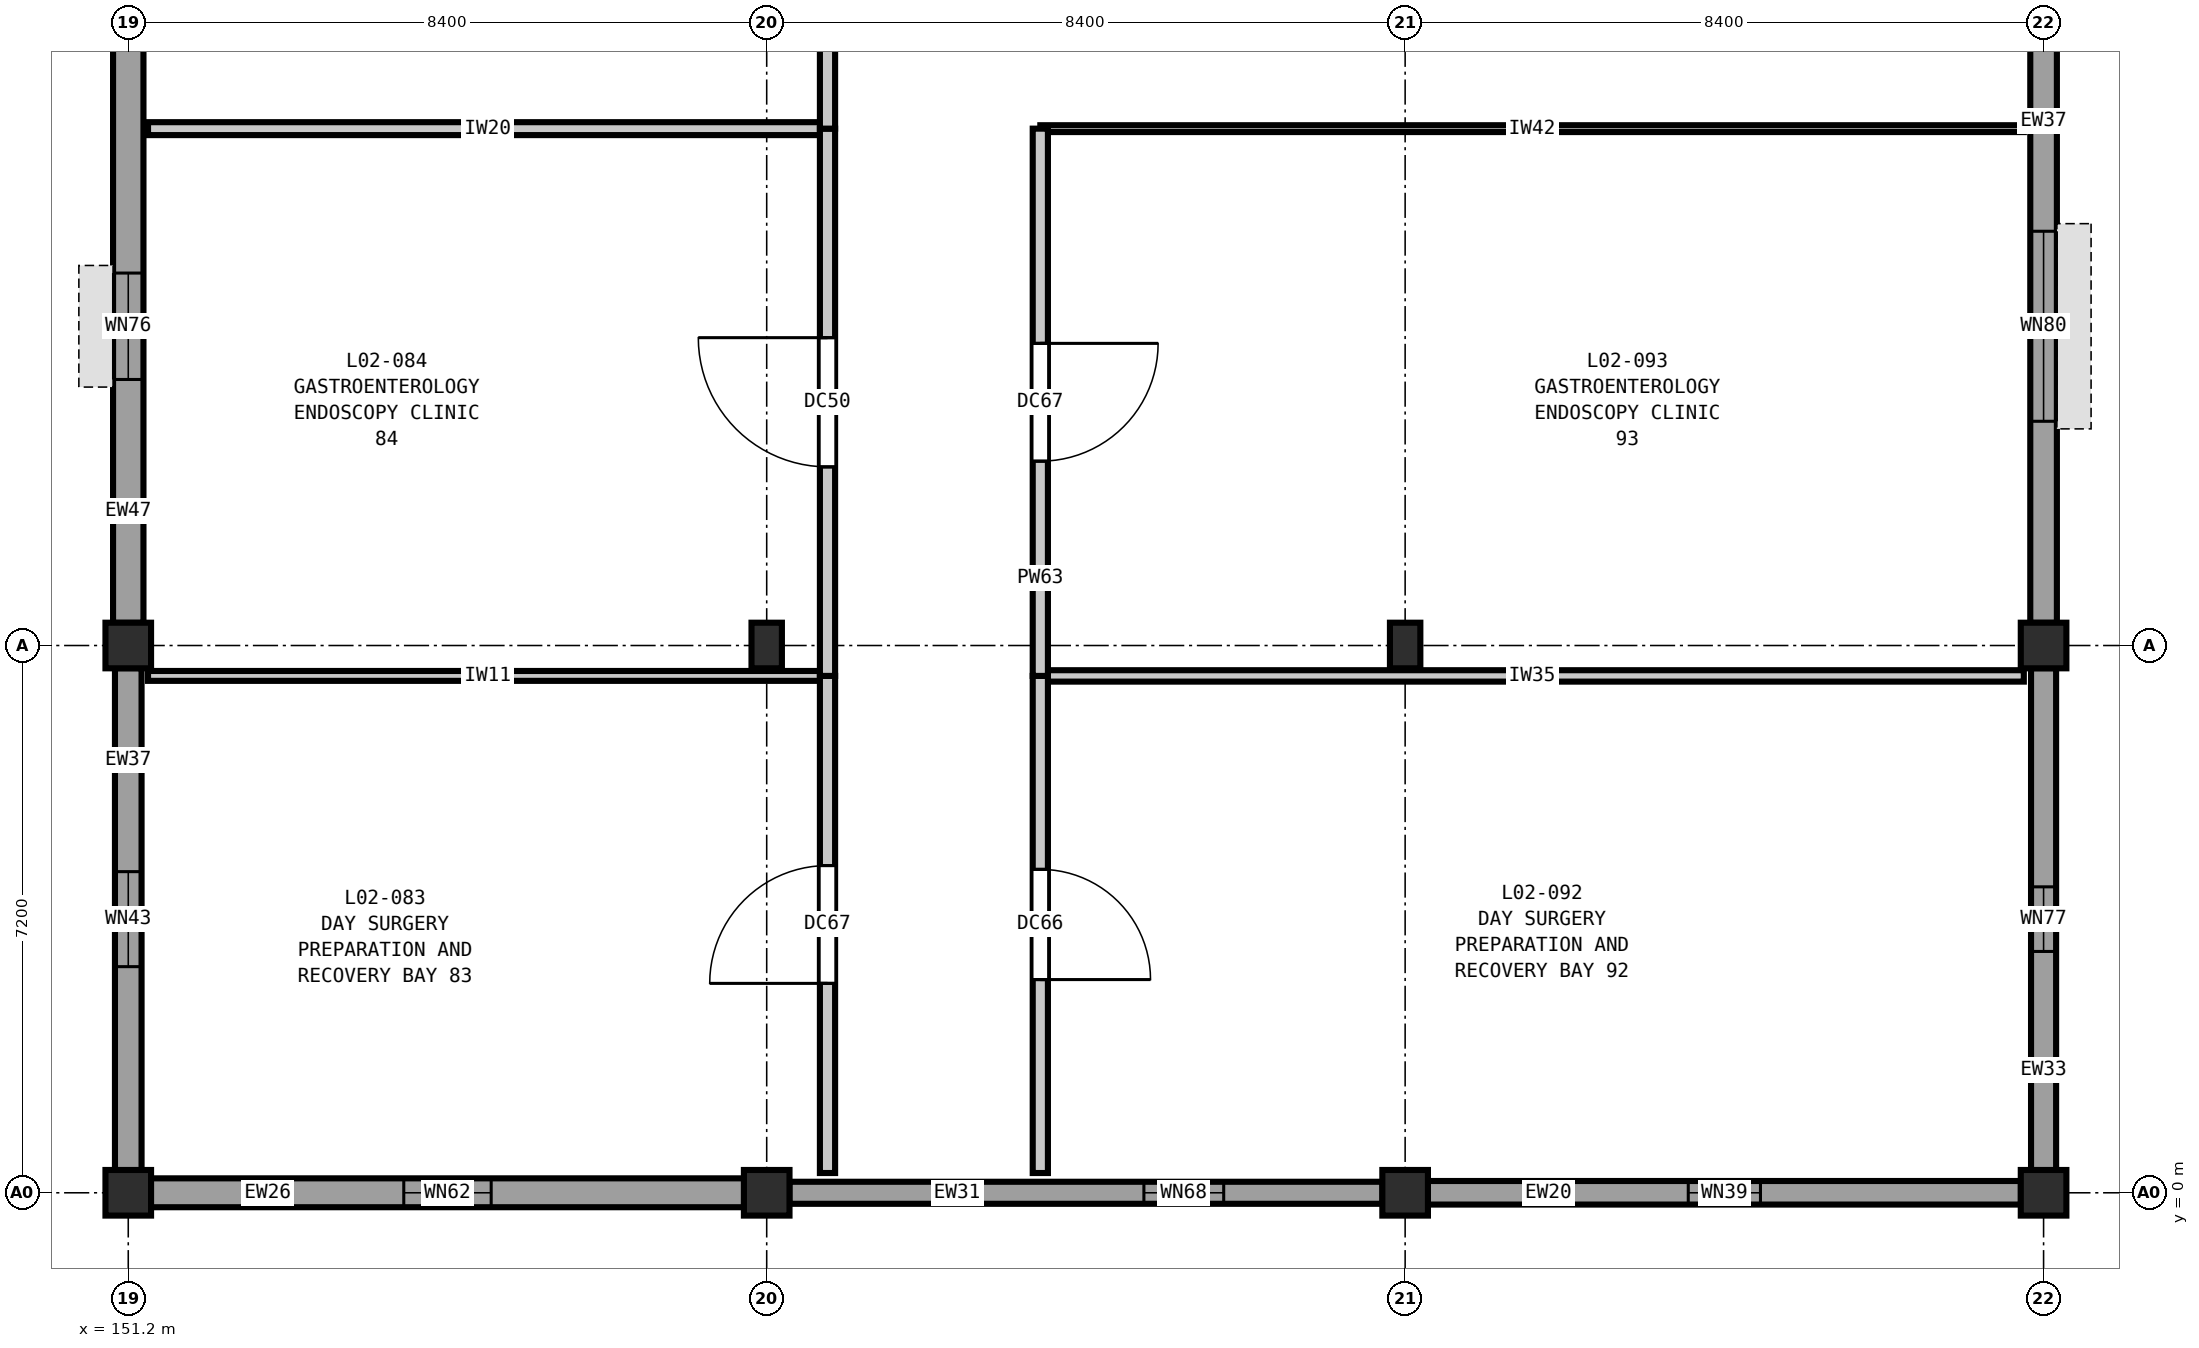
"""IFC4 building model, lengths in metres.
Left out: names, types, materials, properties, quantities, classifications, styles, units other than length and angle.
Written with IfcOpenShell. Run it as: python <this file> out.ifc"""

import sys

from ifc_helpers import new_model, si_unit, direction, frame, frame_2d, origin, origin_2d, place, context, subcontext, project, spatial, rectangle, extrude, element, fill, save


model = new_model("IFC4")
c1 = context("Model", 3, precision=1e-05, world=origin(), true_north=direction((0.0, 1.0)))
c2 = subcontext(c1, "Body", "Model", "MODEL_VIEW")
j1 = project(units=[si_unit("LENGTHUNIT", "METRE"), si_unit("PLANEANGLEUNIT", "RADIAN")], contexts=[c1])
p1 = place(None, origin())
s1 = spatial("IfcSite", under=j1, at=p1, CompositionType="ELEMENT")
p2 = place(p1, origin())
s2 = spatial("IfcBuilding", under=s1, at=p2, CompositionType="ELEMENT")
p3 = place(p2, frame((0.0, 0.0, 10.8)))
s3 = spatial("IfcBuildingStorey", under=s2, at=p3, CompositionType="ELEMENT", Elevation=10.8)
for number, where, z_axis, x_axis in (
    (1, (151.2, 0.0, 0.0), (0.0, 0.0, 1.0), (1.0, 0.0, 0.0)),
    (2, (151.2, 7.2, 0.0), (0.0, 0.0, 1.0), (1.0, 0.0, 0.0)),
    (3, (159.6, 0.0, 0.0), (0.0, 0.0, 1.0), (1.0, 0.0, 0.0)),
):
    element("IfcColumn", number, at=place(p3, frame(where, z_axis=z_axis, x_axis=x_axis)), inside=s3, PredefinedType="COLUMN", context=c2, shape_type="SweptSolid", body=[
        extrude(rectangle(XDim=0.6, YDim=0.6, at=origin_2d()), origin(), (0.0, 0.0, 1.0), 5.4),
    ])
p4 = place(p3, frame((159.6, 7.2, 0.0), z_axis=(0.0, 0.0, 1.0), x_axis=(1.0, 0.0, 0.0)))
e4 = element("IfcColumn", 4, at=p4, inside=s3, PredefinedType="COLUMN", context=c2, shape_type="SweptSolid", body=[
    extrude(rectangle(XDim=0.4, YDim=0.6, at=origin_2d()), origin(), (0.0, 0.0, 1.0), 5.4),
])
p5 = place(p3, frame((168.0, 0.0, 0.0), z_axis=(0.0, 0.0, 1.0), x_axis=(1.0, 0.0, 0.0)))
e5 = element("IfcColumn", 5, at=p5, inside=s3, PredefinedType="COLUMN", context=c2, shape_type="SweptSolid", body=[
    extrude(rectangle(XDim=0.6, YDim=0.6, at=origin_2d()), origin(), (0.0, 0.0, 1.0), 5.4),
])
p6 = place(p3, frame((168.0, 7.2, 0.0), z_axis=(0.0, 0.0, 1.0), x_axis=(1.0, 0.0, 0.0)))
e6 = element("IfcColumn", 6, at=p6, inside=s3, PredefinedType="COLUMN", context=c2, shape_type="SweptSolid", body=[
    extrude(rectangle(XDim=0.4, YDim=0.6, at=origin_2d()), origin(), (0.0, 0.0, 1.0), 5.4),
])
for number, where, z_axis, x_axis in (
    (7, (176.4, 0.0, 0.0), (0.0, 0.0, 1.0), (1.0, 0.0, 0.0)),
    (8, (176.4, 7.2, 0.0), (0.0, 0.0, 1.0), (1.0, 0.0, 0.0)),
):
    element("IfcColumn", number, at=place(p3, frame(where, z_axis=z_axis, x_axis=x_axis)), inside=s3, PredefinedType="COLUMN", context=c2, shape_type="SweptSolid", body=[
        extrude(rectangle(XDim=0.6, YDim=0.6, at=origin_2d()), origin(), (0.0, 0.0, 1.0), 5.4),
    ])
p7 = place(p3, frame((176.4, 15.302, 0.0), z_axis=(0.0, 0.0, 1.0), x_axis=(0.0, -1.0, 0.0)))
e9 = element("IfcWall", 9, at=p7, inside=s3, PredefinedType="SOLIDWALL", context=c2, shape_type="SweptSolid", body=[
    extrude(rectangle(XDim=7.804, YDim=0.35, at=frame_2d((3.902, 0.0))), origin(), (0.0, 0.0, 1.0), 4.68),
])
p8 = place(p7, frame((2.652, 0.0, 0.9)))
e10 = element("IfcOpeningElement", 10, at=p8, cuts=e9, PredefinedType="OPENING", context=c2, shape_type="SweptSolid", body=[
    extrude(rectangle(XDim=2.5, YDim=2.35, at=frame_2d((1.25, 1.175))), frame((0.0, 0.185, 0.0), z_axis=(0.0, -1.0, 0.0), x_axis=(1.0, 0.0, 0.0)), (0.0, 0.0, 1.0), 0.37),
])
p9 = place(p3, frame((176.4, 6.902, 0.0), z_axis=(0.0, 0.0, 1.0), x_axis=(0.0, -1.0, 0.0)))
e11 = element("IfcWall", 11, at=p9, inside=s3, PredefinedType="SOLIDWALL", context=c2, shape_type="SweptSolid", body=[
    extrude(rectangle(XDim=6.604, YDim=0.33, at=frame_2d((3.302, 0.0))), origin(), (0.0, 0.0, 1.0), 4.68),
])
p10 = place(p9, frame((2.877, 0.0, 0.9)))
e12 = element("IfcOpeningElement", 12, at=p10, cuts=e11, PredefinedType="OPENING", context=c2, shape_type="SweptSolid", body=[
    extrude(rectangle(XDim=0.85, YDim=1.4, at=frame_2d((0.425, 0.7))), frame((0.0, 0.175, 0.0), z_axis=(0.0, -1.0, 0.0), x_axis=(1.0, 0.0, 0.0)), (0.0, 0.0, 1.0), 0.35),
])
p11 = place(p3, frame((176.102, 0.0, 0.0), z_axis=(0.0, 0.0, 1.0), x_axis=(-1.0, 0.0, 0.0)))
e13 = element("IfcWall", 13, at=p11, inside=s3, PredefinedType="SOLIDWALL", context=c2, shape_type="SweptSolid", body=[
    extrude(rectangle(XDim=7.804, YDim=0.31, at=frame_2d((3.902, 0.0))), origin(), (0.0, 0.0, 1.0), 4.68),
])
p12 = place(p11, frame((3.427, 0.0, 0.9)))
e14 = element("IfcOpeningElement", 14, at=p12, cuts=e13, PredefinedType="OPENING", context=c2, shape_type="SweptSolid", body=[
    extrude(rectangle(XDim=0.95, YDim=1.4, at=frame_2d((0.475, 0.7))), frame((0.0, 0.165, 0.0), z_axis=(0.0, -1.0, 0.0), x_axis=(1.0, 0.0, 0.0)), (0.0, 0.0, 1.0), 0.33),
])
p13 = place(p3, frame((167.702, 0.0, 0.0), z_axis=(0.0, 0.0, 1.0), x_axis=(-1.0, 0.0, 0.0)))
e15 = element("IfcWall", 15, at=p13, inside=s3, PredefinedType="SOLIDWALL", context=c2, shape_type="SweptSolid", body=[
    extrude(rectangle(XDim=7.804, YDim=0.29, at=frame_2d((3.902, 0.0))), origin(), (0.0, 0.0, 1.0), 4.68),
])
p14 = place(p13, frame((2.089, 0.0, 0.9)))
e16 = element("IfcOpeningElement", 16, at=p14, cuts=e15, PredefinedType="OPENING", context=c2, shape_type="SweptSolid", body=[
    extrude(rectangle(XDim=1.05, YDim=1.4, at=frame_2d((0.525, 0.7))), frame((0.0, 0.155, 0.0), z_axis=(0.0, -1.0, 0.0), x_axis=(1.0, 0.0, 0.0)), (0.0, 0.0, 1.0), 0.31),
])
p15 = place(p3, frame((159.302, 0.0, 0.0), z_axis=(0.0, 0.0, 1.0), x_axis=(-1.0, 0.0, 0.0)))
e17 = element("IfcWall", 17, at=p15, inside=s3, PredefinedType="SOLIDWALL", context=c2, shape_type="SweptSolid", body=[
    extrude(rectangle(XDim=7.804, YDim=0.38, at=frame_2d((3.902, 0.0))), origin(), (0.0, 0.0, 1.0), 4.68),
])
p16 = place(p15, frame((3.327, 0.0, 0.9)))
e18 = element("IfcOpeningElement", 18, at=p16, cuts=e17, PredefinedType="OPENING", context=c2, shape_type="SweptSolid", body=[
    extrude(rectangle(XDim=1.15, YDim=1.4, at=frame_2d((0.575, 0.7))), frame((0.0, 0.2, 0.0), z_axis=(0.0, -1.0, 0.0), x_axis=(1.0, 0.0, 0.0)), (0.0, 0.0, 1.0), 0.4),
])
p17 = place(p3, frame((151.2, 0.298, 0.0), z_axis=(0.0, 0.0, 1.0), x_axis=(0.0, 1.0, 0.0)))
e19 = element("IfcWall", 19, at=p17, inside=s3, PredefinedType="SOLIDWALL", context=c2, shape_type="SweptSolid", body=[
    extrude(rectangle(XDim=6.604, YDim=0.35, at=frame_2d((3.302, 0.0))), origin(), (0.0, 0.0, 1.0), 4.68),
])
p18 = place(p17, frame((2.677, 0.0, 0.9)))
e20 = element("IfcOpeningElement", 20, at=p18, cuts=e19, PredefinedType="OPENING", context=c2, shape_type="SweptSolid", body=[
    extrude(rectangle(XDim=1.25, YDim=1.4, at=frame_2d((0.625, 0.7))), frame((0.0, 0.185, 0.0), z_axis=(0.0, -1.0, 0.0), x_axis=(1.0, 0.0, 0.0)), (0.0, 0.0, 1.0), 0.37),
])
p19 = place(p3, frame((151.2, 7.498, 0.0), z_axis=(0.0, 0.0, 1.0), x_axis=(0.0, 1.0, 0.0)))
e21 = element("IfcWall", 21, at=p19, inside=s3, PredefinedType="SOLIDWALL", context=c2, shape_type="SweptSolid", body=[
    extrude(rectangle(XDim=7.804, YDim=0.4, at=frame_2d((3.902, 0.0))), origin(), (0.0, 0.0, 1.0), 4.68),
])
p20 = place(p19, frame((3.202, 0.0, 0.9)))
e22 = element("IfcOpeningElement", 22, at=p20, cuts=e21, PredefinedType="OPENING", context=c2, shape_type="SweptSolid", body=[
    extrude(rectangle(XDim=1.4, YDim=1.4, at=frame_2d((0.7, 0.7))), frame((0.0, 0.21, 0.0), z_axis=(0.0, -1.0, 0.0), x_axis=(1.0, 0.0, 0.0)), (0.0, 0.0, 1.0), 0.42),
])
p21 = place(p3, frame((151.46, 6.8, 0.0), z_axis=(0.0, 0.0, 1.0), x_axis=(1.0, 0.0, 0.0)))
e23 = element("IfcWall", 23, at=p21, inside=s3, PredefinedType="PARTITIONING", context=c2, shape_type="SweptSolid", body=[
    extrude(rectangle(XDim=8.94, YDim=0.13, at=frame_2d((4.47, 0.0))), origin(), (0.0, 0.0, 1.0), 5.07),
])
p22 = place(p3, frame((163.2, 6.8, 0.0), z_axis=(0.0, 0.0, 1.0), x_axis=(1.0, 0.0, 0.0)))
e24 = element("IfcWall", 24, at=p22, inside=s3, PredefinedType="PARTITIONING", context=c2, shape_type="SweptSolid", body=[
    extrude(rectangle(XDim=12.94, YDim=0.15, at=frame_2d((6.47, 0.0))), origin(), (0.0, 0.0, 1.0), 5.07),
])
p23 = place(p3, frame((151.46, 14.0, 0.0), z_axis=(0.0, 0.0, 1.0), x_axis=(1.0, 0.0, 0.0)))
e25 = element("IfcWall", 25, at=p23, inside=s3, PredefinedType="PARTITIONING", context=c2, shape_type="SweptSolid", body=[
    extrude(rectangle(XDim=8.94, YDim=0.17, at=frame_2d((4.47, 0.0))), origin(), (0.0, 0.0, 1.0), 5.07),
])
p24 = place(p3, frame((163.2, 14.0, 0.0), z_axis=(0.0, 0.0, 1.0), x_axis=(1.0, 0.0, 0.0)))
e26 = element("IfcWall", 26, at=p24, inside=s3, PredefinedType="PARTITIONING", context=c2, shape_type="SweptSolid", body=[
    extrude(rectangle(XDim=12.94, YDim=0.09, at=frame_2d((6.47, 0.0))), origin(), (0.0, 0.0, 1.0), 5.07),
])
p25 = place(p3, frame((160.4, 0.26, 0.0), z_axis=(0.0, 0.0, 1.0), x_axis=(0.0, 1.0, 0.0)))
e27 = element("IfcWall", 27, at=p25, inside=s3, PredefinedType="PARTITIONING", context=c2, shape_type="SweptSolid", body=[
    extrude(rectangle(XDim=6.54, YDim=0.2, at=frame_2d((3.27, 0.0))), origin(), (0.0, 0.0, 1.0), 5.07),
])
p26 = place(p25, frame((2.495, 0.0, 0.0)))
e28 = element("IfcOpeningElement", 28, at=p26, cuts=e27, PredefinedType="OPENING", context=c2, shape_type="SweptSolid", body=[
    extrude(rectangle(XDim=1.55, YDim=2.25, at=frame_2d((0.775, 1.125))), frame((0.0, 0.11, 0.0), z_axis=(0.0, -1.0, 0.0), x_axis=(1.0, 0.0, 0.0)), (0.0, 0.0, 1.0), 0.22),
])
p27 = place(p3, frame((160.4, 6.8, 0.0), z_axis=(0.0, 0.0, 1.0), x_axis=(0.0, 1.0, 0.0)))
e29 = element("IfcWall", 29, at=p27, inside=s3, PredefinedType="PARTITIONING", context=c2, shape_type="SweptSolid", body=[
    extrude(rectangle(XDim=7.2, YDim=0.2, at=frame_2d((3.6, 0.0))), origin(), (0.0, 0.0, 1.0), 5.07),
])
p28 = place(p27, frame((2.75, 0.0, 0.0)))
e30 = element("IfcOpeningElement", 30, at=p28, cuts=e29, PredefinedType="OPENING", context=c2, shape_type="SweptSolid", body=[
    extrude(rectangle(XDim=1.7, YDim=2.3, at=frame_2d((0.85, 1.15))), frame((0.0, 0.11, 0.0), z_axis=(0.0, -1.0, 0.0), x_axis=(1.0, 0.0, 0.0)), (0.0, 0.0, 1.0), 0.22),
])
p29 = place(p3, frame((160.4, 14.0, 0.0), z_axis=(0.0, 0.0, 1.0), x_axis=(0.0, 1.0, 0.0)))
e31 = element("IfcWall", 31, at=p29, inside=s3, PredefinedType="PARTITIONING", context=c2, shape_type="SweptSolid", body=[
    extrude(rectangle(XDim=6.8, YDim=0.2, at=frame_2d((3.4, 0.0))), origin(), (0.0, 0.0, 1.0), 5.07),
])
p30 = place(p29, frame((2.475, 0.0, 0.0)))
e32 = element("IfcOpeningElement", 32, at=p30, cuts=e31, PredefinedType="OPENING", context=c2, shape_type="SweptSolid", body=[
    extrude(rectangle(XDim=1.85, YDim=2.3, at=frame_2d((0.925, 1.15))), frame((0.0, 0.11, 0.0), z_axis=(0.0, -1.0, 0.0), x_axis=(1.0, 0.0, 0.0)), (0.0, 0.0, 1.0), 0.22),
])
p31 = place(p3, frame((163.2, 0.26, 0.0), z_axis=(0.0, 0.0, 1.0), x_axis=(0.0, 1.0, 0.0)))
e33 = element("IfcWall", 33, at=p31, inside=s3, PredefinedType="PARTITIONING", context=c2, shape_type="SweptSolid", body=[
    extrude(rectangle(XDim=6.54, YDim=0.2, at=frame_2d((3.27, 0.0))), origin(), (0.0, 0.0, 1.0), 5.07),
])
p32 = place(p31, frame((2.545, 0.0, 0.0)))
e34 = element("IfcOpeningElement", 34, at=p32, cuts=e33, PredefinedType="OPENING", context=c2, shape_type="SweptSolid", body=[
    extrude(rectangle(XDim=1.45, YDim=2.25, at=frame_2d((0.725, 1.125))), frame((0.0, 0.11, 0.0), z_axis=(0.0, -1.0, 0.0), x_axis=(1.0, 0.0, 0.0)), (0.0, 0.0, 1.0), 0.22),
])
p33 = place(p3, frame((163.2, 6.8, 0.0), z_axis=(0.0, 0.0, 1.0), x_axis=(0.0, 1.0, 0.0)))
e35 = element("IfcWall", 35, at=p33, inside=s3, PredefinedType="PARTITIONING", context=c2, shape_type="SweptSolid", body=[
    extrude(rectangle(XDim=7.2, YDim=0.2, at=frame_2d((3.6, 0.0))), origin(), (0.0, 0.0, 1.0), 5.07),
])
p34 = place(p33, frame((2.825, 0.0, 0.0)))
e36 = element("IfcOpeningElement", 36, at=p34, cuts=e35, PredefinedType="OPENING", context=c2, shape_type="SweptSolid", body=[
    extrude(rectangle(XDim=1.55, YDim=2.25, at=frame_2d((0.775, 1.125))), frame((0.0, 0.11, 0.0), z_axis=(0.0, -1.0, 0.0), x_axis=(1.0, 0.0, 0.0)), (0.0, 0.0, 1.0), 0.22),
])
p35 = place(p8, origin())
e37 = element("IfcWindow", 37, at=p35, inside=s3, PartitioningType="DOUBLE_PANEL_VERTICAL", PredefinedType="WINDOW", context=c2, shape_type="SweptSolid", body=[
    extrude(rectangle(XDim=2.5, YDim=2.35, at=frame_2d((1.25, 1.175))), frame((0.0, 0.03, 0.0), z_axis=(0.0, -1.0, 0.0), x_axis=(1.0, 0.0, 0.0)), (0.0, 0.0, 1.0), 0.06),
])
fill(e10, e37)
p36 = place(p10, origin())
e38 = element("IfcWindow", 38, at=p36, inside=s3, PartitioningType="SINGLE_PANEL", PredefinedType="WINDOW", context=c2, shape_type="SweptSolid", body=[
    extrude(rectangle(XDim=0.85, YDim=1.4, at=frame_2d((0.425, 0.7))), frame((0.0, 0.03, 0.0), z_axis=(0.0, -1.0, 0.0), x_axis=(1.0, 0.0, 0.0)), (0.0, 0.0, 1.0), 0.06),
])
fill(e12, e38)
p37 = place(p12, origin())
e39 = element("IfcWindow", 39, at=p37, inside=s3, PartitioningType="SINGLE_PANEL", PredefinedType="WINDOW", context=c2, shape_type="SweptSolid", body=[
    extrude(rectangle(XDim=0.95, YDim=1.4, at=frame_2d((0.475, 0.7))), frame((0.0, 0.03, 0.0), z_axis=(0.0, -1.0, 0.0), x_axis=(1.0, 0.0, 0.0)), (0.0, 0.0, 1.0), 0.06),
])
fill(e14, e39)
p38 = place(p14, origin())
e40 = element("IfcWindow", 40, at=p38, inside=s3, PartitioningType="SINGLE_PANEL", PredefinedType="WINDOW", context=c2, shape_type="SweptSolid", body=[
    extrude(rectangle(XDim=1.05, YDim=1.4, at=frame_2d((0.525, 0.7))), frame((0.0, 0.03, 0.0), z_axis=(0.0, -1.0, 0.0), x_axis=(1.0, 0.0, 0.0)), (0.0, 0.0, 1.0), 0.06),
])
fill(e16, e40)
p39 = place(p16, origin())
e41 = element("IfcWindow", 41, at=p39, inside=s3, PartitioningType="SINGLE_PANEL", PredefinedType="WINDOW", context=c2, shape_type="SweptSolid", body=[
    extrude(rectangle(XDim=1.15, YDim=1.4, at=frame_2d((0.575, 0.7))), frame((0.0, 0.03, 0.0), z_axis=(0.0, -1.0, 0.0), x_axis=(1.0, 0.0, 0.0)), (0.0, 0.0, 1.0), 0.06),
])
fill(e18, e41)
p40 = place(p18, origin())
e42 = element("IfcWindow", 42, at=p40, inside=s3, PartitioningType="SINGLE_PANEL", PredefinedType="WINDOW", context=c2, shape_type="SweptSolid", body=[
    extrude(rectangle(XDim=1.25, YDim=1.4, at=frame_2d((0.625, 0.7))), frame((0.0, 0.03, 0.0), z_axis=(0.0, -1.0, 0.0), x_axis=(1.0, 0.0, 0.0)), (0.0, 0.0, 1.0), 0.06),
])
fill(e20, e42)
p41 = place(p20, origin())
e43 = element("IfcWindow", 43, at=p41, inside=s3, PartitioningType="SINGLE_PANEL", PredefinedType="WINDOW", context=c2, shape_type="SweptSolid", body=[
    extrude(rectangle(XDim=1.4, YDim=1.4, at=frame_2d((0.7, 0.7))), frame((0.0, 0.03, 0.0), z_axis=(0.0, -1.0, 0.0), x_axis=(1.0, 0.0, 0.0)), (0.0, 0.0, 1.0), 0.06),
])
fill(e22, e43)
p42 = place(p26, origin())
e44 = element("IfcDoor", 44, at=p42, inside=s3, OperationType="SINGLE_SWING_LEFT", PredefinedType="DOOR", context=c2, shape_type="SweptSolid", body=[
    extrude(rectangle(XDim=1.55, YDim=2.25, at=frame_2d((0.775, 1.125))), frame((0.0, 0.025, 0.0), z_axis=(0.0, -1.0, 0.0), x_axis=(1.0, 0.0, 0.0)), (0.0, 0.0, 1.0), 0.05),
])
fill(e28, e44)
p43 = place(p28, origin())
e45 = element("IfcDoor", 45, at=p43, inside=s3, OperationType="SINGLE_SWING_RIGHT", PredefinedType="DOOR", context=c2, shape_type="SweptSolid", body=[
    extrude(rectangle(XDim=1.7, YDim=2.3, at=frame_2d((0.85, 1.15))), frame((0.0, 0.025, 0.0), z_axis=(0.0, -1.0, 0.0), x_axis=(1.0, 0.0, 0.0)), (0.0, 0.0, 1.0), 0.05),
])
fill(e30, e45)
p44 = place(p32, frame((1.45, 0.0, 0.0), z_axis=(0.0, 0.0, 1.0), x_axis=(-1.0, 0.0, 0.0)))
e46 = element("IfcDoor", 46, at=p44, inside=s3, OperationType="SINGLE_SWING_RIGHT", PredefinedType="DOOR", context=c2, shape_type="SweptSolid", body=[
    extrude(rectangle(XDim=1.45, YDim=2.25, at=frame_2d((0.725, 1.125))), frame((0.0, 0.025, 0.0), z_axis=(0.0, -1.0, 0.0), x_axis=(1.0, 0.0, 0.0)), (0.0, 0.0, 1.0), 0.05),
])
fill(e34, e46)
p45 = place(p34, frame((1.55, 0.0, 0.0), z_axis=(0.0, 0.0, 1.0), x_axis=(-1.0, 0.0, 0.0)))
e47 = element("IfcDoor", 47, at=p45, inside=s3, OperationType="SINGLE_SWING_LEFT", PredefinedType="DOOR", context=c2, shape_type="SweptSolid", body=[
    extrude(rectangle(XDim=1.55, YDim=2.25, at=frame_2d((0.775, 1.125))), frame((0.0, 0.025, 0.0), z_axis=(0.0, -1.0, 0.0), x_axis=(1.0, 0.0, 0.0)), (0.0, 0.0, 1.0), 0.05),
])
fill(e36, e47)
save(model, sys.argv[1])
